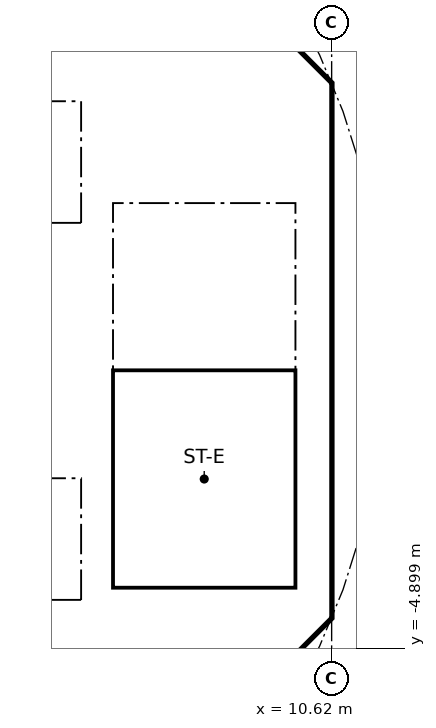
"""IFC4 building model, lengths in metres.
Left out: names, types, materials, properties, quantities, classifications, styles, units other than length and angle.
Written with IfcOpenShell. Run it as: python <this file> out.ifc"""

import sys

from ifc_helpers import new_model, si_unit, direction, frame, frame_2d, origin, place, context, subcontext, project, spatial, polyline, rectangle, outline, extrude, element, fill, save


model = new_model("IFC4")
c1 = context("Model", 3, precision=1e-05, world=origin(), true_north=direction((0.0, 1.0)))
c2 = subcontext(c1, "Body", "Model", "MODEL_VIEW")
j1 = project(units=[si_unit("LENGTHUNIT", "METRE"), si_unit("PLANEANGLEUNIT", "RADIAN")], contexts=[c1])
p1 = place(None, origin())
s1 = spatial("IfcSite", under=j1, at=p1, CompositionType="ELEMENT")
p2 = place(p1, origin())
s2 = spatial("IfcBuilding", under=s1, at=p2, CompositionType="ELEMENT")
p3 = place(p2, frame((0.0, 0.0, 223.3)))
s3 = spatial("IfcBuildingStorey", under=s2, at=p3, CompositionType="ELEMENT", Elevation=223.3)
p4 = place(p3, frame((9.988, 4.613, 0.0), z_axis=(0.0, 0.0, 1.0), x_axis=(-0.707106781187, 0.707106781187, 0.0)))
e1 = element("IfcWall", 1, at=p4, inside=s3, PredefinedType="SHEAR", context=c2, shape_type="SweptSolid", body=[
    extrude(rectangle(XDim=7.602, YDim=0.6, at=frame_2d((3.801, 0.0))), origin(), (0.0, 0.0, 1.0), 3.44),
])
p5 = place(p4, frame((3.201, 0.0, 0.0)))
e2 = element("IfcOpeningElement", 2, at=p5, cuts=e1, PredefinedType="OPENING", context=c2, shape_type="SweptSolid", body=[
    extrude(rectangle(XDim=1.2, YDim=2.1, at=frame_2d((0.6, 1.05))), frame((0.0, 0.31, 0.0), z_axis=(0.0, -1.0, 0.0), x_axis=(1.0, 0.0, 0.0)), (0.0, 0.0, 1.0), 0.62),
])
p6 = place(p3, frame((4.613, -9.988, 0.0), z_axis=(0.0, 0.0, 1.0), x_axis=(0.707106781187, 0.707106781187, 0.0)))
e3 = element("IfcWall", 3, at=p6, inside=s3, PredefinedType="SHEAR", context=c2, shape_type="SweptSolid", body=[
    extrude(rectangle(XDim=7.602, YDim=0.6, at=frame_2d((3.801, 0.0))), origin(), (0.0, 0.0, 1.0), 3.44),
])
p7 = place(p6, frame((3.201, 0.0, 0.0)))
e4 = element("IfcOpeningElement", 4, at=p7, cuts=e3, PredefinedType="OPENING", context=c2, shape_type="SweptSolid", body=[
    extrude(rectangle(XDim=1.2, YDim=2.1, at=frame_2d((0.6, 1.05))), frame((0.0, 0.31, 0.0), z_axis=(0.0, -1.0, 0.0), x_axis=(1.0, 0.0, 0.0)), (0.0, 0.0, 1.0), 0.62),
])
p8 = place(p3, frame((-6.7, 2.0, 0.0), z_axis=(0.0, 0.0, 1.0), x_axis=(1.0, 0.0, 0.0)))
e5 = element("IfcWall", 5, at=p8, inside=s3, PredefinedType="SOLIDWALL", context=c2, shape_type="SweptSolid", body=[
    extrude(rectangle(XDim=13.4, YDim=0.2, at=frame_2d((6.7, 0.0))), origin(), (0.0, 0.0, 1.0), 3.44),
])
p9 = place(p8, frame((7.25, 0.0, 0.0)))
e6 = element("IfcOpeningElement", 6, at=p9, cuts=e5, PredefinedType="OPENING", context=c2, shape_type="SweptSolid", body=[
    extrude(rectangle(XDim=1.1, YDim=2.1, at=frame_2d((0.55, 1.05))), frame((0.0, 0.11, 0.0), z_axis=(0.0, -1.0, 0.0), x_axis=(1.0, 0.0, 0.0)), (0.0, 0.0, 1.0), 0.22),
])
p10 = place(p8, frame((9.45, 0.0, 0.0)))
e7 = element("IfcOpeningElement", 7, at=p10, cuts=e5, PredefinedType="OPENING", context=c2, shape_type="SweptSolid", body=[
    extrude(rectangle(XDim=1.1, YDim=2.1, at=frame_2d((0.55, 1.05))), frame((0.0, 0.11, 0.0), z_axis=(0.0, -1.0, 0.0), x_axis=(1.0, 0.0, 0.0)), (0.0, 0.0, 1.0), 0.22),
])
p11 = place(p8, frame((1.85, 0.0, 0.0)))
e8 = element("IfcOpeningElement", 8, at=p11, cuts=e5, PredefinedType="OPENING", context=c2, shape_type="SweptSolid", body=[
    extrude(rectangle(XDim=0.9, YDim=2.1, at=frame_2d((0.45, 1.05))), frame((0.0, 0.11, 0.0), z_axis=(0.0, -1.0, 0.0), x_axis=(1.0, 0.0, 0.0)), (0.0, 0.0, 1.0), 0.22),
])
p12 = place(p8, frame((5.15, 0.0, 0.0)))
e9 = element("IfcOpeningElement", 9, at=p12, cuts=e5, PredefinedType="OPENING", context=c2, shape_type="SweptSolid", body=[
    extrude(rectangle(XDim=0.9, YDim=2.1, at=frame_2d((0.45, 1.05))), frame((0.0, 0.11, 0.0), z_axis=(0.0, -1.0, 0.0), x_axis=(1.0, 0.0, 0.0)), (0.0, 0.0, 1.0), 0.22),
])
p13 = place(p3, frame((6.7, 4.0, 0.0), z_axis=(0.0, 0.0, 1.0), x_axis=(1.0, 0.0, 0.0)))
e10 = element("IfcWall", 10, at=p13, inside=s3, PredefinedType="SOLIDWALL", context=c2, shape_type="SweptSolid", body=[
    extrude(rectangle(XDim=3.325, YDim=0.2, at=frame_2d((1.662, 0.0))), origin(), (0.0, 0.0, 1.0), 3.44),
])
p14 = place(p13, frame((1.25, 0.0, 0.0)))
e11 = element("IfcOpeningElement", 11, at=p14, cuts=e10, PredefinedType="OPENING", context=c2, shape_type="SweptSolid", body=[
    extrude(rectangle(XDim=1.1, YDim=2.1, at=frame_2d((0.55, 1.05))), frame((0.0, 0.11, 0.0), z_axis=(0.0, -1.0, 0.0), x_axis=(1.0, 0.0, 0.0)), (0.0, 0.0, 1.0), 0.22),
])
p15 = place(p3, frame((-6.7, -2.0, 0.0), z_axis=(0.0, 0.0, 1.0), x_axis=(1.0, 0.0, 0.0)))
e12 = element("IfcWall", 12, at=p15, inside=s3, PredefinedType="SOLIDWALL", context=c2, shape_type="SweptSolid", body=[
    extrude(rectangle(XDim=13.4, YDim=0.2, at=frame_2d((6.7, 0.0))), origin(), (0.0, 0.0, 1.0), 3.44),
])
p16 = place(p15, frame((5.05, 0.0, 0.0)))
e13 = element("IfcOpeningElement", 13, at=p16, cuts=e12, PredefinedType="OPENING", context=c2, shape_type="SweptSolid", body=[
    extrude(rectangle(XDim=1.1, YDim=2.1, at=frame_2d((0.55, 1.05))), frame((0.0, 0.11, 0.0), z_axis=(0.0, -1.0, 0.0), x_axis=(1.0, 0.0, 0.0)), (0.0, 0.0, 1.0), 0.22),
])
p17 = place(p15, frame((7.25, 0.0, 0.0)))
e14 = element("IfcOpeningElement", 14, at=p17, cuts=e12, PredefinedType="OPENING", context=c2, shape_type="SweptSolid", body=[
    extrude(rectangle(XDim=1.1, YDim=2.1, at=frame_2d((0.55, 1.05))), frame((0.0, 0.11, 0.0), z_axis=(0.0, -1.0, 0.0), x_axis=(1.0, 0.0, 0.0)), (0.0, 0.0, 1.0), 0.22),
])
p18 = place(p15, frame((1.85, 0.0, 0.0)))
e15 = element("IfcOpeningElement", 15, at=p18, cuts=e12, PredefinedType="OPENING", context=c2, shape_type="SweptSolid", body=[
    extrude(rectangle(XDim=0.9, YDim=2.1, at=frame_2d((0.45, 1.05))), frame((0.0, 0.11, 0.0), z_axis=(0.0, -1.0, 0.0), x_axis=(1.0, 0.0, 0.0)), (0.0, 0.0, 1.0), 0.22),
])
p19 = place(p3, origin())
e16 = element("IfcWall", 16, at=p19, inside=s3, PredefinedType="SHEAR", context=c2, shape_type="SweptSolid", body=[
    extrude(outline(polyline([(9.776, -4.401), (10.025, -4.152), (10.025, -3.801), (10.025, 4.152), (9.776, 4.401), (10.2, 4.825), (10.625, 4.401), (10.625, -4.401), (10.2, -4.825), (9.776, -4.401)])), origin(), (0.0, 0.0, 1.0), 3.44),
])
p20 = place(p3, origin())
e17 = element("IfcWall", 17, at=p20, inside=s3, PredefinedType="SOLIDWALL", context=c2, shape_type="SweptSolid", body=[
    extrude(outline(polyline([(-6.7, -2.1), (-6.5, -2.1), (-6.5, -4.1), (-2.3, -4.1), (-2.3, -2.1), (-2.1, -2.1), (-2.1, -4.1), (-0.1, -4.1), (-0.1, -2.1), (0.1, -2.1), (0.1, -4.1), (2.1, -4.1), (2.1, -2.1), (2.3, -2.1), (2.3, -4.1), (4.3, -4.1), (4.3, -2.1), (4.5, -2.1), (4.5, -4.1), (6.5, -4.1), (6.5, -2.1), (6.7, -2.1), (6.7, -4.3), (-6.7, -4.3), (-6.7, -2.1)])), origin(), (0.0, 0.0, 1.0), 3.44),
])
p21 = place(p3, origin())
e18 = element("IfcWall", 18, at=p21, inside=s3, PredefinedType="SOLIDWALL", context=c2, shape_type="SweptSolid", body=[
    extrude(outline(polyline([(-6.7, 4.3), (6.7, 4.3), (6.7, 2.1), (6.5, 2.1), (6.5, 4.1), (4.5, 4.1), (4.5, 2.1), (4.3, 2.1), (4.3, 4.1), (2.3, 4.1), (2.3, 2.1), (2.1, 2.1), (2.1, 4.1), (0.1, 4.1), (0.1, 2.1), (-0.1, 2.1), (-0.1, 4.1), (-2.1, 4.1), (-2.1, 2.1), (-2.3, 2.1), (-2.3, 4.1), (-6.5, 4.1), (-6.5, 2.1), (-6.7, 2.1), (-6.7, 4.3)])), origin(), (0.0, 0.0, 1.0), 3.44),
])
p22 = place(p3, origin())
e19 = element("IfcWall", 19, at=p22, inside=s3, PredefinedType="SOLIDWALL", context=c2, shape_type="SweptSolid", body=[
    extrude(outline(polyline([(7.025, -3.9), (6.7, -3.9), (6.7, 3.9), (7.025, 3.9), (7.025, -3.9)])), origin(), (0.0, 0.0, 1.0), 3.44),
])
p23 = place(p3, origin())
e20 = element("IfcWall", 20, at=p23, inside=s3, PredefinedType="SOLIDWALL", context=c2, shape_type="SweptSolid", body=[
    extrude(outline(polyline([(10.025, -4.1), (6.7, -4.1), (6.7, -3.9), (10.025, -3.9), (10.025, -4.1)])), origin(), (0.0, 0.0, 1.0), 3.44),
])
p24 = place(p14, frame((1.1, 0.0, 0.0), x_axis=(-1.0, 0.0, 0.0)))
e21 = element("IfcDoor", 21, at=p24, inside=s3, OperationType="SINGLE_SWING_RIGHT", PredefinedType="DOOR", context=c2, shape_type="SweptSolid", body=[
    extrude(rectangle(XDim=1.1, YDim=2.1, at=frame_2d((0.55, 1.05))), frame((0.0, 0.025, 0.0), z_axis=(0.0, -1.0, 0.0), x_axis=(1.0, 0.0, 0.0)), (0.0, 0.0, 1.0), 0.05),
])
fill(e11, e21)
save(model, sys.argv[1])
